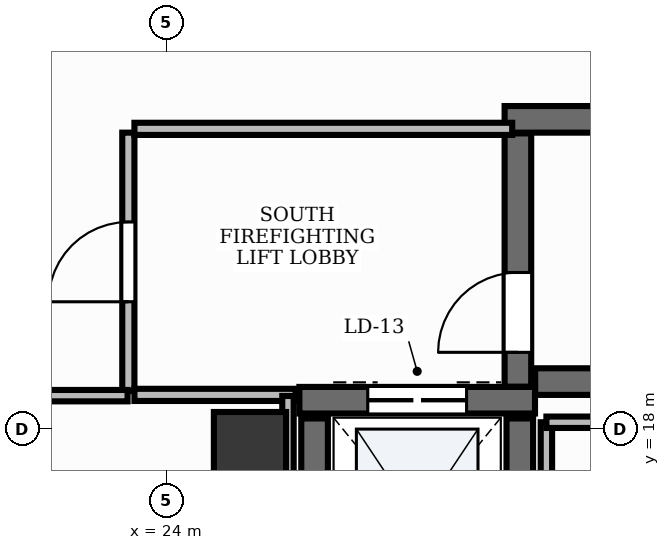
"""IFC4 building model, lengths in metres.
Left out: names, types, materials, properties, quantities, classifications, styles, units other than length and angle.
Written with IfcOpenShell. Run it as: python <this file> out.ifc"""

import sys

from ifc_helpers import new_model, si_unit, direction, frame, frame_2d, origin, origin_2d, place, context, subcontext, project, spatial, rectangle, extrude, element, fill, save


model = new_model("IFC4")
c1 = context("Model", 3, precision=1e-05, world=origin(), true_north=direction((0.0, 1.0)))
c2 = subcontext(c1, "Body", "Model", "MODEL_VIEW")
j1 = project(units=[si_unit("LENGTHUNIT", "METRE"), si_unit("PLANEANGLEUNIT", "RADIAN")], contexts=[c1])
p1 = place(None, origin())
s1 = spatial("IfcSite", under=j1, at=p1, CompositionType="ELEMENT")
p2 = place(p1, origin())
s2 = spatial("IfcBuilding", under=s1, at=p2, CompositionType="ELEMENT")
p3 = place(p2, frame((0.0, 0.0, 331.2)))
s3 = spatial("IfcBuildingStorey", under=s2, at=p3, CompositionType="ELEMENT", Elevation=331.2)
p4 = place(p3, frame((28.852, 18.625, 0.0), z_axis=(0.0, 0.0, 1.0), x_axis=(1.0, 0.0, 0.0)))
e1 = element("IfcWall", 1, at=p4, inside=s3, PredefinedType="SHEAR", context=c2, shape_type="SweptSolid", body=[
    extrude(rectangle(XDim=8.148, YDim=0.35, at=frame_2d((4.074, 0.0))), origin(), (0.0, 0.0, 1.0), 3.88),
])
p5 = place(p3, frame((28.45, 22.075, 0.0), z_axis=(0.0, 0.0, 1.0), x_axis=(1.0, 0.0, 0.0)))
e2 = element("IfcWall", 2, at=p5, inside=s3, PredefinedType="SHEAR", context=c2, shape_type="SweptSolid", body=[
    extrude(rectangle(XDim=8.55, YDim=0.35, at=frame_2d((4.275, 0.0))), origin(), (0.0, 0.0, 1.0), 3.88),
])
p6 = place(p3, frame((28.625, 18.557, 0.0), z_axis=(0.0, 0.0, 1.0), x_axis=(0.0, 1.0, 0.0)))
e3 = element("IfcWall", 3, at=p6, inside=s3, PredefinedType="SHEAR", context=c2, shape_type="SweptSolid", body=[
    extrude(rectangle(XDim=3.333, YDim=0.35, at=frame_2d((1.667, 0.0))), origin(), (0.0, 0.0, 1.0), 3.88),
])
p7 = place(p6, frame((0.453, 0.0, 0.0)))
e4 = element("IfcOpeningElement", 4, at=p7, cuts=e3, PredefinedType="OPENING", context=c2, shape_type="SweptSolid", body=[
    extrude(rectangle(XDim=1.05, YDim=2.15, at=frame_2d((0.525, 1.075))), frame((0.0, 0.19, 0.0), z_axis=(0.0, -1.0, 0.0), x_axis=(1.0, 0.0, 0.0)), (0.0, 0.0, 1.0), 0.38),
])
p8 = place(p3, frame((25.75, 18.38, 0.0), z_axis=(0.0, 0.0, 1.0), x_axis=(1.0, 0.0, 0.0)))
e5 = element("IfcWall", 5, at=p8, inside=s3, PredefinedType="SHEAR", context=c2, shape_type="SweptSolid", body=[
    extrude(rectangle(XDim=3.1, YDim=0.35, at=frame_2d((1.55, 0.0))), origin(), (0.0, 0.0, 1.0), 3.88),
])
p9 = place(p8, frame((0.9, 0.0, 0.0)))
e6 = element("IfcOpeningElement", 6, at=p9, cuts=e5, PredefinedType="OPENING", context=c2, shape_type="SweptSolid", body=[
    extrude(rectangle(XDim=1.3, YDim=2.2, at=frame_2d((0.65, 1.1))), frame((0.0, 0.19, 0.0), z_axis=(0.0, -1.0, 0.0), x_axis=(1.0, 0.0, 0.0)), (0.0, 0.0, 1.0), 0.38),
])
for number, where, z_axis, x_axis in (
    (7, (25.95, 15.44, 0.0), (0.0, 0.0, 1.0), (0.0, 1.0, 0.0)),
    (8, (28.65, 15.44, 0.0), (0.0, 0.0, 1.0), (0.0, 1.0, 0.0)),
):
    element("IfcWall", number, at=place(p3, frame(where, z_axis=z_axis, x_axis=x_axis)), inside=s3, PredefinedType="SHEAR", context=c2, shape_type="SweptSolid", body=[
        extrude(rectangle(XDim=2.7, YDim=0.35, at=frame_2d((1.35, 0.0))), origin(), (0.0, 0.0, 1.0), 3.88),
    ])
p10 = place(p3, frame((25.1, 17.75, -0.0), z_axis=(0.0, 0.0, 1.0), x_axis=(1.0, 0.0, 0.0)))
e9 = element("IfcColumn", 9, at=p10, inside=s3, PredefinedType="PILASTER", context=c2, shape_type="SweptSolid", body=[
    extrude(rectangle(XDim=0.95, YDim=0.95, at=origin_2d()), origin(), (0.0, 0.0, 1.0), 3.881),
])
p11 = place(p3, frame((23.5, 18.5, 0.0), z_axis=(0.0, 0.0, 1.0), x_axis=(0.0, 1.0, 0.0)))
e10 = element("IfcWall", 10, at=p11, inside=s3, PredefinedType="PARTITIONING", context=c2, shape_type="SweptSolid", body=[
    extrude(rectangle(XDim=3.4, YDim=0.16, at=frame_2d((1.7, 0.0))), origin(), (0.0, 0.0, 1.0), 2.22),
])
p12 = place(p11, frame((1.175, 0.0, 0.0)))
e11 = element("IfcOpeningElement", 11, at=p12, cuts=e10, PredefinedType="OPENING", context=c2, shape_type="SweptSolid", body=[
    extrude(rectangle(XDim=1.05, YDim=2.15, at=frame_2d((0.525, 1.075))), frame((0.0, 0.095, 0.0), z_axis=(0.0, -1.0, 0.0), x_axis=(1.0, 0.0, 0.0)), (0.0, 0.0, 1.0), 0.19),
])
p13 = place(p3, frame((23.58, 21.95, 0.0), z_axis=(0.0, 0.0, 1.0), x_axis=(1.0, 0.0, 0.0)))
e12 = element("IfcWall", 12, at=p13, inside=s3, PredefinedType="PARTITIONING", context=c2, shape_type="SweptSolid", body=[
    extrude(rectangle(XDim=4.97, YDim=0.16, at=frame_2d((2.485, 0.0))), origin(), (0.0, 0.0, 1.0), 2.22),
])
p14 = place(p3, frame((23.58, 18.45, 0.0), z_axis=(0.0, 0.0, 1.0), x_axis=(1.0, 0.0, 0.0)))
e13 = element("IfcWall", 13, at=p14, inside=s3, PredefinedType="PARTITIONING", context=c2, shape_type="SweptSolid", body=[
    extrude(rectangle(XDim=2.12, YDim=0.16, at=frame_2d((1.06, 0.0))), origin(), (0.0, 0.0, 1.0), 2.22),
])
p15 = place(p3, frame((25.6, 18.436, 0.0), z_axis=(0.0, 0.0, 1.0), x_axis=(0.0, -1.0, 0.0)))
e14 = element("IfcWall", 14, at=p15, inside=s3, PredefinedType="PARTITIONING", context=c2, shape_type="SweptSolid", body=[
    extrude(rectangle(XDim=3.029, YDim=0.15, at=frame_2d((1.515, 0.0))), origin(), (0.0, 0.0, 1.0), 2.22),
])
p16 = place(p3, frame((29.0, 14.954, 0.0), z_axis=(0.0, 0.0, 1.0), x_axis=(0.0, 1.0, 0.0)))
e15 = element("IfcWall", 15, at=p16, inside=s3, PredefinedType="PARTITIONING", context=c2, shape_type="SweptSolid", body=[
    extrude(rectangle(XDim=3.136, YDim=0.15, at=frame_2d((1.568, 0.0))), origin(), (0.0, 0.0, 1.0), 2.22),
])
p17 = place(p3, frame((29.0, 18.09, 0.0), z_axis=(0.0, 0.0, 1.0), x_axis=(1.0, 0.0, 0.0)))
e16 = element("IfcWall", 16, at=p17, inside=s3, PredefinedType="PARTITIONING", context=c2, shape_type="SweptSolid", body=[
    extrude(rectangle(XDim=8.35, YDim=0.15, at=frame_2d((4.175, 0.0))), origin(), (0.0, 0.0, 1.0), 2.22),
])
p18 = place(p3, frame((21.8, 18.44, 0.0), z_axis=(0.0, 0.0, 1.0), x_axis=(1.0, 0.0, 0.0)))
e17 = element("IfcWall", 17, at=p18, inside=s3, PredefinedType="PARTITIONING", context=c2, shape_type="SweptSolid", body=[
    extrude(rectangle(XDim=1.69, YDim=0.15, at=frame_2d((0.845, 0.0))), origin(), (0.0, 0.0, 1.0), 2.22),
])
p19 = place(p7, origin())
e18 = element("IfcDoor", 18, at=p19, inside=s3, OperationType="SINGLE_SWING_LEFT", PredefinedType="DOOR", context=c2, shape_type="SweptSolid", body=[
    extrude(rectangle(XDim=1.05, YDim=2.15, at=frame_2d((0.525, 1.075))), frame((0.0, 0.025, 0.0), z_axis=(0.0, -1.0, 0.0), x_axis=(1.0, 0.0, 0.0)), (0.0, 0.0, 1.0), 0.05),
])
fill(e4, e18)
p20 = place(p9, origin())
e19 = element("IfcDoor", 19, at=p20, inside=s3, OperationType="DOUBLE_DOOR_SLIDING", PredefinedType="DOOR", context=c2, shape_type="SweptSolid", body=[
    extrude(rectangle(XDim=1.3, YDim=2.2, at=frame_2d((0.65, 1.1))), frame((0.0, 0.025, 0.0), z_axis=(0.0, -1.0, 0.0), x_axis=(1.0, 0.0, 0.0)), (0.0, 0.0, 1.0), 0.05),
])
fill(e6, e19)
p21 = place(p12, origin())
e20 = element("IfcDoor", 20, at=p21, inside=s3, OperationType="SINGLE_SWING_LEFT", PredefinedType="DOOR", context=c2, shape_type="SweptSolid", body=[
    extrude(rectangle(XDim=1.05, YDim=2.15, at=frame_2d((0.525, 1.075))), frame((0.0, 0.025, 0.0), z_axis=(0.0, -1.0, 0.0), x_axis=(1.0, 0.0, 0.0)), (0.0, 0.0, 1.0), 0.05),
])
fill(e11, e20)
save(model, sys.argv[1])
